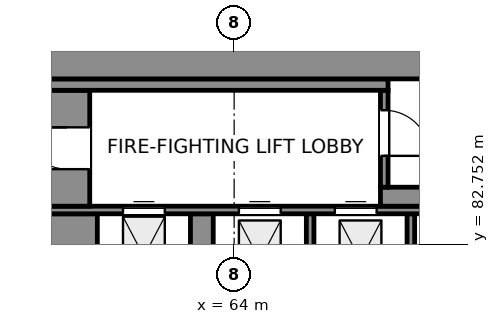
"""IFC4 building model, lengths in metres.
Left out: names, types, materials, properties, quantities, classifications, styles, units other than length and angle.
Written with IfcOpenShell. Run it as: python <this file> out.ifc"""

import sys

from ifc_helpers import new_model, si_unit, direction, frame, frame_2d, origin, place, context, subcontext, project, spatial, rectangle, extrude, element, fill, save


model = new_model("IFC4")
c1 = context("Model", 3, precision=1e-05, world=origin(), true_north=direction((0.0, 1.0)))
c2 = subcontext(c1, "Body", "Model", "MODEL_VIEW")
j1 = project(units=[si_unit("LENGTHUNIT", "METRE"), si_unit("PLANEANGLEUNIT", "RADIAN")], contexts=[c1])
p1 = place(None, origin())
s1 = spatial("IfcSite", under=j1, at=p1, CompositionType="ELEMENT")
p2 = place(p1, origin())
s2 = spatial("IfcBuilding", under=s1, at=p2, CompositionType="ELEMENT")
p3 = place(p2, frame((0.0, 0.0, -10.0)))
s3 = spatial("IfcBuildingStorey", under=s2, at=p3, CompositionType="ELEMENT", Elevation=-10.0)
for number, where, z_axis, x_axis in (
    (1, (66.0, 81.1, 0.0), (0.0, 0.0, 1.0), (0.0, 1.0, 0.0)),
    (2, (68.65, 81.1, 0.0), (0.0, 0.0, 1.0), (0.0, 1.0, 0.0)),
):
    element("IfcWall", number, at=place(p3, frame(where, z_axis=z_axis, x_axis=x_axis)), inside=s3, PredefinedType="SHEAR", context=c2, shape_type="SweptSolid", body=[
        extrude(rectangle(XDim=2.45, YDim=0.2, at=frame_2d((1.225, 0.0))), origin(), (0.0, 0.0, 1.0), 5.0),
    ])
p4 = place(p3, frame((59.7, 81.3, 0.0), z_axis=(0.0, 0.0, 1.0), x_axis=(0.0, 1.0, 0.0)))
e3 = element("IfcWall", 3, at=p4, inside=s3, PredefinedType="SHEAR", context=c2, shape_type="SweptSolid", body=[
    extrude(rectangle(XDim=2.25, YDim=1.4, at=frame_2d((1.125, 0.0))), origin(), (0.0, 0.0, 1.0), 5.0),
])
p5 = place(p3, frame((63.15, 81.3, 0.0), z_axis=(0.0, 0.0, 1.0), x_axis=(0.0, 1.0, 0.0)))
e4 = element("IfcWall", 4, at=p5, inside=s3, PredefinedType="SHEAR", context=c2, shape_type="SweptSolid", body=[
    extrude(rectangle(XDim=2.25, YDim=0.6, at=frame_2d((1.125, 0.0))), origin(), (0.0, 0.0, 1.0), 5.0),
])
p6 = place(p3, frame((59.0, 83.65, 0.0), z_axis=(0.0, 0.0, 1.0), x_axis=(1.0, 0.0, 0.0)))
e5 = element("IfcWall", 5, at=p6, inside=s3, PredefinedType="SHEAR", context=c2, shape_type="SweptSolid", body=[
    extrude(rectangle(XDim=22.0, YDim=0.2, at=frame_2d((11.0, 0.0))), origin(), (0.0, 0.0, 1.0), 5.0),
])
p7 = place(p6, frame((5.125, 0.0, 0.0)))
e6 = element("IfcOpeningElement", 6, at=p7, cuts=e5, PredefinedType="OPENING", context=c2, shape_type="SweptSolid", body=[
    extrude(rectangle(XDim=1.1, YDim=2.1, at=frame_2d((0.55, 1.05))), frame((0.0, 0.11, 0.0), z_axis=(0.0, -1.0, 0.0), x_axis=(1.0, 0.0, 0.0)), (0.0, 0.0, 1.0), 0.22),
])
p8 = place(p6, frame((7.65, 0.0, 0.0)))
e7 = element("IfcOpeningElement", 7, at=p8, cuts=e5, PredefinedType="OPENING", context=c2, shape_type="SweptSolid", body=[
    extrude(rectangle(XDim=1.1, YDim=2.1, at=frame_2d((0.55, 1.05))), frame((0.0, 0.11, 0.0), z_axis=(0.0, -1.0, 0.0), x_axis=(1.0, 0.0, 0.0)), (0.0, 0.0, 1.0), 0.22),
])
p9 = place(p6, frame((18.775, 0.0, 0.0)))
e8 = element("IfcOpeningElement", 8, at=p9, cuts=e5, PredefinedType="OPENING", context=c2, shape_type="SweptSolid", body=[
    extrude(rectangle(XDim=1.2, YDim=2.1, at=frame_2d((0.6, 1.05))), frame((0.0, 0.11, 0.0), z_axis=(0.0, -1.0, 0.0), x_axis=(1.0, 0.0, 0.0)), (0.0, 0.0, 1.0), 0.22),
])
p10 = place(p6, frame((2.075, 0.0, 0.0)))
e9 = element("IfcOpeningElement", 9, at=p10, cuts=e5, PredefinedType="OPENING", context=c2, shape_type="SweptSolid", body=[
    extrude(rectangle(XDim=1.1, YDim=2.1, at=frame_2d((0.55, 1.05))), frame((0.0, 0.11, 0.0), z_axis=(0.0, -1.0, 0.0), x_axis=(1.0, 0.0, 0.0)), (0.0, 0.0, 1.0), 0.22),
])
p11 = place(p3, frame((59.6, 83.75, 0.0), z_axis=(0.0, 0.0, 1.0), x_axis=(0.0, 1.0, 0.0)))
e10 = element("IfcWall", 10, at=p11, inside=s3, PredefinedType="SHEAR", context=c2, shape_type="SweptSolid", body=[
    extrude(rectangle(XDim=3.05, YDim=1.2, at=frame_2d((1.525, 0.0))), origin(), (0.0, 0.0, 1.0), 5.0),
])
p12 = place(p11, frame((0.975, 0.0, 0.0)))
e11 = element("IfcOpeningElement", 11, at=p12, cuts=e10, PredefinedType="OPENING", context=c2, shape_type="SweptSolid", body=[
    extrude(rectangle(XDim=1.1, YDim=2.1, at=frame_2d((0.55, 1.05))), frame((0.0, 0.61, 0.0), z_axis=(0.0, -1.0, 0.0), x_axis=(1.0, 0.0, 0.0)), (0.0, 0.0, 1.0), 1.22),
])
p13 = place(p3, frame((67.85, 84.0, 0.0), z_axis=(0.0, 0.0, 1.0), x_axis=(1.0, 0.0, 0.0)))
e12 = element("IfcWall", 12, at=p13, inside=s3, PredefinedType="SHEAR", context=c2, shape_type="SweptSolid", body=[
    extrude(rectangle(XDim=9.1, YDim=0.5, at=frame_2d((4.55, 0.0))), origin(), (0.0, 0.0, 1.0), 5.0),
])
p14 = place(p3, frame((67.95, 84.25, 0.0), z_axis=(0.0, 0.0, 1.0), x_axis=(0.0, 1.0, 0.0)))
e13 = element("IfcWall", 13, at=p14, inside=s3, PredefinedType="SHEAR", context=c2, shape_type="SweptSolid", body=[
    extrude(rectangle(XDim=2.55, YDim=0.2, at=frame_2d((1.275, 0.0))), origin(), (0.0, 0.0, 1.0), 5.0),
])
p15 = place(p14, frame((0.825, 0.0, 0.0)))
e14 = element("IfcOpeningElement", 14, at=p15, cuts=e13, PredefinedType="OPENING", context=c2, shape_type="SweptSolid", body=[
    extrude(rectangle(XDim=1.2, YDim=2.1, at=frame_2d((0.6, 1.05))), frame((0.0, 0.11, 0.0), z_axis=(0.0, -1.0, 0.0), x_axis=(1.0, 0.0, 0.0)), (0.0, 0.0, 1.0), 0.22),
])
p16 = place(p3, frame((59.0, 86.95, 0.0), z_axis=(0.0, 0.0, 1.0), x_axis=(1.0, 0.0, 0.0)))
e15 = element("IfcWall", 15, at=p16, inside=s3, PredefinedType="SHEAR", context=c2, shape_type="SweptSolid", body=[
    extrude(rectangle(XDim=9.05, YDim=0.3, at=frame_2d((4.525, 0.0))), origin(), (0.0, 0.0, 1.0), 5.0),
])
p17 = place(p3, frame((59.0, 87.55, 0.0), z_axis=(0.0, 0.0, 1.0), x_axis=(1.0, 0.0, 0.0)))
e16 = element("IfcWall", 16, at=p17, inside=s3, PredefinedType="SHEAR", context=c2, shape_type="SweptSolid", body=[
    extrude(rectangle(XDim=22.0, YDim=0.9, at=frame_2d((11.0, 0.0))), origin(), (0.0, 0.0, 1.0), 5.0),
])
p18 = place(p15, frame((1.2, 0.0, 0.0), z_axis=(0.0, 0.0, 1.0), x_axis=(-1.0, 0.0, 0.0)))
e17 = element("IfcDoor", 17, at=p18, inside=s3, OperationType="SINGLE_SWING_RIGHT", PredefinedType="DOOR", context=c2, shape_type="SweptSolid", body=[
    extrude(rectangle(XDim=1.2, YDim=2.1, at=frame_2d((0.6, 1.05))), frame((0.0, 0.025, 0.0), z_axis=(0.0, -1.0, 0.0), x_axis=(1.0, 0.0, 0.0)), (0.0, 0.0, 1.0), 0.05),
])
fill(e14, e17)
p19 = place(p12, origin())
e18 = element("IfcDoor", 18, at=p19, inside=s3, OperationType="SINGLE_SWING_RIGHT", PredefinedType="DOOR", context=c2, shape_type="SweptSolid", body=[
    extrude(rectangle(XDim=1.1, YDim=2.1, at=frame_2d((0.55, 1.05))), frame((0.0, 0.025, 0.0), z_axis=(0.0, -1.0, 0.0), x_axis=(1.0, 0.0, 0.0)), (0.0, 0.0, 1.0), 0.05),
])
fill(e11, e18)
p20 = place(p7, origin())
e19 = element("IfcDoor", 19, at=p20, inside=s3, OperationType="DOUBLE_DOOR_SLIDING", PredefinedType="DOOR", context=c2, shape_type="SweptSolid", body=[
    extrude(rectangle(XDim=1.1, YDim=2.1, at=frame_2d((0.55, 1.05))), frame((0.0, 0.025, 0.0), z_axis=(0.0, -1.0, 0.0), x_axis=(1.0, 0.0, 0.0)), (0.0, 0.0, 1.0), 0.05),
])
fill(e6, e19)
p21 = place(p8, origin())
e20 = element("IfcDoor", 20, at=p21, inside=s3, OperationType="DOUBLE_DOOR_SLIDING", PredefinedType="DOOR", context=c2, shape_type="SweptSolid", body=[
    extrude(rectangle(XDim=1.1, YDim=2.1, at=frame_2d((0.55, 1.05))), frame((0.0, 0.025, 0.0), z_axis=(0.0, -1.0, 0.0), x_axis=(1.0, 0.0, 0.0)), (0.0, 0.0, 1.0), 0.05),
])
fill(e7, e20)
p22 = place(p10, origin())
e21 = element("IfcDoor", 21, at=p22, inside=s3, OperationType="DOUBLE_DOOR_SLIDING", PredefinedType="DOOR", context=c2, shape_type="SweptSolid", body=[
    extrude(rectangle(XDim=1.1, YDim=2.1, at=frame_2d((0.55, 1.05))), frame((0.0, 0.025, 0.0), z_axis=(0.0, -1.0, 0.0), x_axis=(1.0, 0.0, 0.0)), (0.0, 0.0, 1.0), 0.05),
])
fill(e9, e21)
save(model, sys.argv[1])
